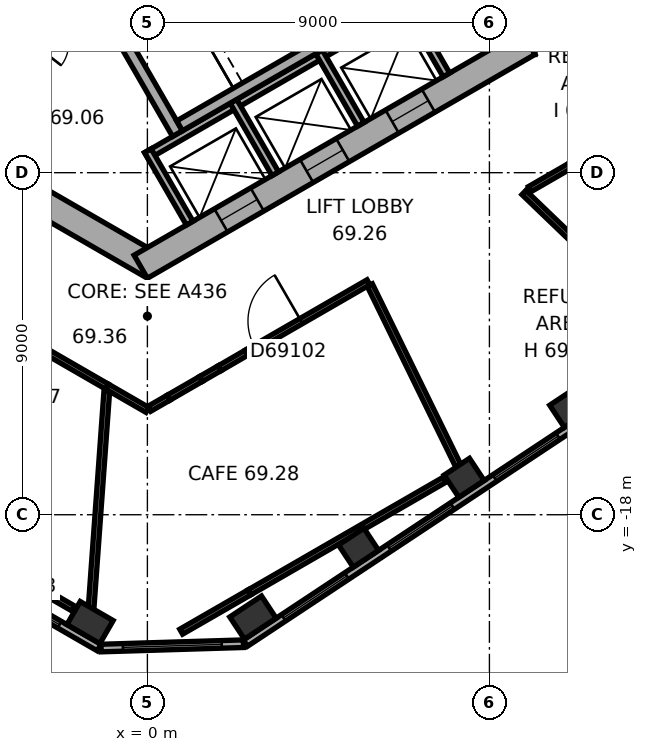
"""IFC4 building model, lengths in metres.
Left out: names, types, materials, properties, quantities, classifications, styles, units other than length and angle.
Written with IfcOpenShell. Run it as: python <this file> out.ifc"""

import sys

from ifc_helpers import new_model, si_unit, direction, frame, frame_2d, origin, origin_2d, place, context, subcontext, project, spatial, rectangle, extrude, element, fill, save


model = new_model("IFC4")
c1 = context("Model", 3, precision=1e-05, world=origin(), true_north=direction((0.0, 1.0)))
c2 = subcontext(c1, "Body", "Model", "MODEL_VIEW")
j1 = project(units=[si_unit("LENGTHUNIT", "METRE"), si_unit("PLANEANGLEUNIT", "RADIAN")], contexts=[c1])
p1 = place(None, origin())
s1 = spatial("IfcSite", under=j1, at=p1, CompositionType="ELEMENT")
p2 = place(p1, origin())
s2 = spatial("IfcBuilding", under=s1, at=p2, CompositionType="ELEMENT")
p3 = place(p2, frame((0.0, 0.0, 278.3)))
s3 = spatial("IfcBuildingStorey", under=s2, at=p3, CompositionType="ELEMENT", Elevation=278.3)
for number, where, z_axis, x_axis in (
    (1, (-1.509, -20.837, 0.0), (0.0, 0.0, 1.0), (0.866, -0.5, 0.0)),
    (2, (2.778, -20.706, 0.0), (0.0, 0.0, 1.0), (0.834, 0.552, 0.0)),
):
    element("IfcColumn", number, at=place(p3, frame(where, z_axis=z_axis, x_axis=x_axis)), inside=s3, PredefinedType="COLUMN", context=c2, shape_type="SweptSolid", body=[
        extrude(rectangle(XDim=1.0, YDim=0.7, at=origin_2d()), origin(), (0.0, 0.0, 1.0), 7.4),
    ])
for number, where, z_axis, x_axis in (
    (3, (5.557, -18.867, 0.0), (0.0, 0.0, 1.0), (0.834, 0.552, 0.0)),
    (4, (8.335, -17.028, 0.0), (0.0, 0.0, 1.0), (0.834, 0.552, 0.0)),
    (5, (11.113, -15.189, 0.0), (0.0, 0.0, 1.0), (0.834, 0.552, 0.0)),
):
    element("IfcColumn", number, at=place(p3, frame(where, z_axis=z_axis, x_axis=x_axis)), inside=s3, PredefinedType="COLUMN", context=c2, shape_type="SweptSolid", body=[
        extrude(rectangle(XDim=0.8, YDim=0.7, at=origin_2d()), origin(), (0.0, 0.0, 1.0), 7.4),
    ])
p4 = place(p3, frame((9.85, -5.889, 0.0), z_axis=(0.0, 0.0, 1.0), x_axis=(0.0, 1.0, 0.0)))
e6 = element("IfcWall", 6, at=p4, inside=s3, PredefinedType="SHEAR", context=c2, shape_type="SweptSolid", body=[
    extrude(rectangle(XDim=11.778, YDim=0.7, at=frame_2d((5.889, 0.0))), origin(), (0.0, 0.0, 1.0), 7.4),
])
p5 = place(p4, frame((6.089, 0.0, 0.0)))
e7 = element("IfcOpeningElement", 7, at=p5, cuts=e6, PredefinedType="OPENING", context=c2, shape_type="SweptSolid", body=[
    extrude(rectangle(XDim=1.5, YDim=2.1, at=frame_2d((0.75, 1.05))), frame((0.0, 0.36, 0.0), z_axis=(0.0, -1.0, 0.0), x_axis=(1.0, 0.0, 0.0)), (0.0, 0.0, 1.0), 0.72),
])
p6 = place(p4, frame((2.939, 0.0, 0.0)))
e8 = element("IfcOpeningElement", 8, at=p6, cuts=e6, PredefinedType="OPENING", context=c2, shape_type="SweptSolid", body=[
    extrude(rectangle(XDim=0.9, YDim=2.1, at=frame_2d((0.45, 1.05))), frame((0.0, 0.36, 0.0), z_axis=(0.0, -1.0, 0.0), x_axis=(1.0, 0.0, 0.0)), (0.0, 0.0, 1.0), 0.72),
])
p7 = place(p3, frame((-10.025, -5.586, 0.0), z_axis=(0.0, 0.0, 1.0), x_axis=(0.866026453023, -0.499998182661, 0.0)))
e9 = element("IfcWall", 9, at=p7, inside=s3, PredefinedType="SHEAR", context=c2, shape_type="SweptSolid", body=[
    extrude(rectangle(XDim=11.778, YDim=0.7, at=frame_2d((5.889, 0.0))), origin(), (0.0, 0.0, 1.0), 7.4),
])
p8 = place(p7, frame((6.089, 0.0, 0.0)))
e10 = element("IfcOpeningElement", 10, at=p8, cuts=e9, PredefinedType="OPENING", context=c2, shape_type="SweptSolid", body=[
    extrude(rectangle(XDim=1.5, YDim=2.1, at=frame_2d((0.75, 1.05))), frame((0.0, 0.36, 0.0), z_axis=(0.0, -1.0, 0.0), x_axis=(1.0, 0.0, 0.0)), (0.0, 0.0, 1.0), 0.72),
])
p9 = place(p7, frame((1.539, 0.0, 0.0)))
e11 = element("IfcOpeningElement", 11, at=p9, cuts=e9, PredefinedType="OPENING", context=c2, shape_type="SweptSolid", body=[
    extrude(rectangle(XDim=1.1, YDim=2.1, at=frame_2d((0.55, 1.05))), frame((0.0, 0.36, 0.0), z_axis=(0.0, -1.0, 0.0), x_axis=(1.0, 0.0, 0.0)), (0.0, 0.0, 1.0), 0.72),
])
p10 = place(p7, frame((4.139, 0.0, 0.0)))
e12 = element("IfcOpeningElement", 12, at=p10, cuts=e9, PredefinedType="OPENING", context=c2, shape_type="SweptSolid", body=[
    extrude(rectangle(XDim=1.1, YDim=2.1, at=frame_2d((0.55, 1.05))), frame((0.0, 0.36, 0.0), z_axis=(0.0, -1.0, 0.0), x_axis=(1.0, 0.0, 0.0)), (0.0, 0.0, 1.0), 0.72),
])
p11 = place(p3, frame((-0.175, -11.475, 0.0), z_axis=(0.0, 0.0, 1.0), x_axis=(0.866026453023, 0.499998182661, 0.0)))
e13 = element("IfcWall", 13, at=p11, inside=s3, PredefinedType="SHEAR", context=c2, shape_type="SweptSolid", body=[
    extrude(rectangle(XDim=11.778, YDim=0.7, at=frame_2d((5.889, 0.0))), origin(), (0.0, 0.0, 1.0), 7.4),
])
p12 = place(p11, frame((2.439, 0.0, 0.0)))
e14 = element("IfcOpeningElement", 14, at=p12, cuts=e13, PredefinedType="OPENING", context=c2, shape_type="SweptSolid", body=[
    extrude(rectangle(XDim=1.1, YDim=2.1, at=frame_2d((0.55, 1.05))), frame((0.0, 0.36, 0.0), z_axis=(0.0, -1.0, 0.0), x_axis=(1.0, 0.0, 0.0)), (0.0, 0.0, 1.0), 0.72),
])
p13 = place(p11, frame((5.039, 0.0, 0.0)))
e15 = element("IfcOpeningElement", 15, at=p13, cuts=e13, PredefinedType="OPENING", context=c2, shape_type="SweptSolid", body=[
    extrude(rectangle(XDim=1.1, YDim=2.1, at=frame_2d((0.55, 1.05))), frame((0.0, 0.36, 0.0), z_axis=(0.0, -1.0, 0.0), x_axis=(1.0, 0.0, 0.0)), (0.0, 0.0, 1.0), 0.72),
])
p14 = place(p11, frame((7.639, 0.0, 0.0)))
e16 = element("IfcOpeningElement", 16, at=p14, cuts=e13, PredefinedType="OPENING", context=c2, shape_type="SweptSolid", body=[
    extrude(rectangle(XDim=1.1, YDim=2.1, at=frame_2d((0.55, 1.05))), frame((0.0, 0.36, 0.0), z_axis=(0.0, -1.0, 0.0), x_axis=(1.0, 0.0, 0.0)), (0.0, 0.0, 1.0), 0.72),
])
p15 = place(p3, frame((-16.626, -12.629, 0.0), z_axis=(0.0, 0.0, 1.0), x_axis=(0.866026460444, -0.499998169808, 0.0)))
e17 = element("IfcWall", 17, at=p15, inside=s3, PredefinedType="STANDARD", context=c2, shape_type="SweptSolid", body=[
    extrude(rectangle(XDim=17.731, YDim=0.2, at=frame_2d((8.866, 0.0))), origin(), (0.0, 0.0, 1.0), 7.4),
])
p16 = place(p15, frame((1.203, 0.0, 0.8)))
e18 = element("IfcOpeningElement", 18, at=p16, cuts=e17, PredefinedType="OPENING", context=c2, shape_type="SweptSolid", body=[
    extrude(rectangle(XDim=2.0, YDim=4.2, at=frame_2d((1.0, 2.1))), frame((0.0, 0.11, 0.0), z_axis=(0.0, -1.0, 0.0), x_axis=(1.0, 0.0, 0.0)), (0.0, 0.0, 1.0), 0.22),
])
p17 = place(p15, frame((4.535, 0.0, 0.8)))
e19 = element("IfcOpeningElement", 19, at=p17, cuts=e17, PredefinedType="OPENING", context=c2, shape_type="SweptSolid", body=[
    extrude(rectangle(XDim=2.0, YDim=4.2, at=frame_2d((1.0, 2.1))), frame((0.0, 0.11, 0.0), z_axis=(0.0, -1.0, 0.0), x_axis=(1.0, 0.0, 0.0)), (0.0, 0.0, 1.0), 0.22),
])
p18 = place(p15, frame((7.867, 0.0, 0.8)))
e20 = element("IfcOpeningElement", 20, at=p18, cuts=e17, PredefinedType="OPENING", context=c2, shape_type="SweptSolid", body=[
    extrude(rectangle(XDim=2.0, YDim=4.2, at=frame_2d((1.0, 2.1))), frame((0.0, 0.11, 0.0), z_axis=(0.0, -1.0, 0.0), x_axis=(1.0, 0.0, 0.0)), (0.0, 0.0, 1.0), 0.22),
])
p19 = place(p15, frame((11.198, 0.0, 0.8)))
e21 = element("IfcOpeningElement", 21, at=p19, cuts=e17, PredefinedType="OPENING", context=c2, shape_type="SweptSolid", body=[
    extrude(rectangle(XDim=2.0, YDim=4.2, at=frame_2d((1.0, 2.1))), frame((0.0, 0.11, 0.0), z_axis=(0.0, -1.0, 0.0), x_axis=(1.0, 0.0, 0.0)), (0.0, 0.0, 1.0), 0.22),
])
p20 = place(p15, frame((14.53, 0.0, 0.8)))
e22 = element("IfcOpeningElement", 22, at=p20, cuts=e17, PredefinedType="OPENING", context=c2, shape_type="SweptSolid", body=[
    extrude(rectangle(XDim=2.0, YDim=4.2, at=frame_2d((1.0, 2.1))), frame((0.0, 0.11, 0.0), z_axis=(0.0, -1.0, 0.0), x_axis=(1.0, 0.0, 0.0)), (0.0, 0.0, 1.0), 0.22),
])
p21 = place(p3, frame((-1.217, -21.508, 0.0), z_axis=(0.0, 0.0, 1.0), x_axis=(0.99953295295, 0.030559384285, 0.0)))
e23 = element("IfcWall", 23, at=p21, inside=s3, PredefinedType="STANDARD", context=c2, shape_type="SweptSolid", body=[
    extrude(rectangle(XDim=3.747, YDim=0.2, at=frame_2d((1.874, 0.0))), origin(), (0.0, 0.0, 1.0), 7.4),
])
p22 = place(p21, frame((0.573, 0.0, 0.8)))
e24 = element("IfcOpeningElement", 24, at=p22, cuts=e23, PredefinedType="OPENING", context=c2, shape_type="SweptSolid", body=[
    extrude(rectangle(XDim=2.6, YDim=4.2, at=frame_2d((1.3, 2.1))), frame((0.0, 0.11, 0.0), z_axis=(0.0, -1.0, 0.0), x_axis=(1.0, 0.0, 0.0)), (0.0, 0.0, 1.0), 0.22),
])
p23 = place(p3, frame((2.58, -21.377, 0.0), z_axis=(0.0, 0.0, 1.0), x_axis=(0.833888592176, 0.551932800112, 0.0)))
e25 = element("IfcWall", 25, at=p23, inside=s3, PredefinedType="STANDARD", context=c2, shape_type="SweptSolid", body=[
    extrude(rectangle(XDim=17.731, YDim=0.2, at=frame_2d((8.866, 0.0))), origin(), (0.0, 0.0, 1.0), 7.4),
])
p24 = place(p23, frame((1.202, 0.0, 0.8)))
e26 = element("IfcOpeningElement", 26, at=p24, cuts=e25, PredefinedType="OPENING", context=c2, shape_type="SweptSolid", body=[
    extrude(rectangle(XDim=2.0, YDim=4.2, at=frame_2d((1.0, 2.1))), frame((0.0, 0.11, 0.0), z_axis=(0.0, -1.0, 0.0), x_axis=(1.0, 0.0, 0.0)), (0.0, 0.0, 1.0), 0.22),
])
p25 = place(p23, frame((4.533, 0.0, 0.8)))
e27 = element("IfcOpeningElement", 27, at=p25, cuts=e25, PredefinedType="OPENING", context=c2, shape_type="SweptSolid", body=[
    extrude(rectangle(XDim=2.0, YDim=4.2, at=frame_2d((1.0, 2.1))), frame((0.0, 0.11, 0.0), z_axis=(0.0, -1.0, 0.0), x_axis=(1.0, 0.0, 0.0)), (0.0, 0.0, 1.0), 0.22),
])
p26 = place(p23, frame((7.865, 0.0, 0.8)))
e28 = element("IfcOpeningElement", 28, at=p26, cuts=e25, PredefinedType="OPENING", context=c2, shape_type="SweptSolid", body=[
    extrude(rectangle(XDim=2.0, YDim=4.2, at=frame_2d((1.0, 2.1))), frame((0.0, 0.11, 0.0), z_axis=(0.0, -1.0, 0.0), x_axis=(1.0, 0.0, 0.0)), (0.0, 0.0, 1.0), 0.22),
])
p27 = place(p23, frame((11.197, 0.0, 0.8)))
e29 = element("IfcOpeningElement", 29, at=p27, cuts=e25, PredefinedType="OPENING", context=c2, shape_type="SweptSolid", body=[
    extrude(rectangle(XDim=2.0, YDim=4.2, at=frame_2d((1.0, 2.1))), frame((0.0, 0.11, 0.0), z_axis=(0.0, -1.0, 0.0), x_axis=(1.0, 0.0, 0.0)), (0.0, 0.0, 1.0), 0.22),
])
p28 = place(p23, frame((14.528, 0.0, 0.8)))
e30 = element("IfcOpeningElement", 30, at=p28, cuts=e25, PredefinedType="OPENING", context=c2, shape_type="SweptSolid", body=[
    extrude(rectangle(XDim=2.0, YDim=4.2, at=frame_2d((1.0, 2.1))), frame((0.0, 0.11, 0.0), z_axis=(0.0, -1.0, 0.0), x_axis=(1.0, 0.0, 0.0)), (0.0, 0.0, 1.0), 0.22),
])
p29 = place(p3, frame((-0.024, -8.559, 0.0), z_axis=(0.0, 0.0, 1.0), x_axis=(0.866026010844, 0.49999894854, 0.0)))
e31 = element("IfcWall", 31, at=p29, inside=s3, PredefinedType="PARTITIONING", context=c2, shape_type="SweptSolid", body=[
    extrude(rectangle(XDim=8.0, YDim=0.2, at=frame_2d((4.0, 0.0))), origin(), (0.0, 0.0, 1.0), 7.12),
])
for number, where, z_axis, x_axis in (
    (32, (0.013, -8.422, 0.0), (0.0, 0.0, 1.0), (0.5, -0.866, 0.0)),
    (33, (2.264, -7.122, 0.0), (0.0, 0.0, 1.0), (0.5, -0.866, 0.0)),
    (34, (4.516, -5.822, 0.0), (0.0, 0.0, 1.0), (0.5, -0.866, 0.0)),
    (35, (6.768, -4.522, 0.0), (0.0, 0.0, 1.0), (0.5, -0.866, 0.0)),
):
    element("IfcWall", number, at=place(p3, frame(where, z_axis=z_axis, x_axis=x_axis)), inside=s3, PredefinedType="PARTITIONING", context=c2, shape_type="SweptSolid", body=[
        extrude(rectangle(XDim=2.2, YDim=0.2, at=frame_2d((1.1, 0.0))), origin(), (0.0, 0.0, 1.0), 7.12),
    ])
p30 = place(p3, frame((-1.558, -3.902, 0.0), z_axis=(0.0, 0.0, 1.0), x_axis=(0.499977259774, -0.866038532462, 0.0)))
e36 = element("IfcWall", 36, at=p30, inside=s3, PredefinedType="SHEAR", context=c2, shape_type="SweptSolid", body=[
    extrude(rectangle(XDim=4.7, YDim=0.3, at=frame_2d((2.35, 0.0))), origin(), (0.0, 0.0, 1.0), 7.12),
])
p31 = place(p30, frame((0.8, 0.0, 0.0)))
e37 = element("IfcOpeningElement", 37, at=p31, cuts=e36, PredefinedType="OPENING", context=c2, shape_type="SweptSolid", body=[
    extrude(rectangle(XDim=1.2, YDim=2.1, at=frame_2d((0.6, 1.05))), frame((0.0, 0.16, 0.0), z_axis=(0.0, -1.0, 0.0), x_axis=(1.0, 0.0, 0.0)), (0.0, 0.0, 1.0), 0.32),
])
p32 = place(p3, frame((0.847, -7.767, 0.0), z_axis=(0.0, 0.0, 1.0), x_axis=(0.866027801685, 0.499995846692, 0.0)))
e38 = element("IfcWall", 38, at=p32, inside=s3, PredefinedType="SHEAR", context=c2, shape_type="SweptSolid", body=[
    extrude(rectangle(XDim=7.06, YDim=0.3, at=frame_2d((3.53, 0.0))), origin(), (0.0, 0.0, 1.0), 7.12),
])
p33 = place(p3, frame((-1.712, -4.008, 0.0), z_axis=(0.0, 0.0, 1.0), x_axis=(-0.616549420702, -0.787316208287, 0.0)))
e39 = element("IfcWall", 39, at=p33, inside=s3, PredefinedType="PARTITIONING", context=c2, shape_type="SweptSolid", body=[
    extrude(rectangle(XDim=3.002, YDim=0.2, at=frame_2d((1.501, 0.0))), origin(), (0.0, 0.0, 1.0), 7.12),
])
p34 = place(p33, frame((1.15, 0.0, 0.0)))
e40 = element("IfcOpeningElement", 40, at=p34, cuts=e39, PredefinedType="OPENING", context=c2, shape_type="SweptSolid", body=[
    extrude(rectangle(XDim=0.9, YDim=2.1, at=frame_2d((0.45, 1.05))), frame((0.0, 0.11, 0.0), z_axis=(0.0, -1.0, 0.0), x_axis=(1.0, 0.0, 0.0)), (0.0, 0.0, 1.0), 0.22),
])
p35 = place(p3, frame((-1.935, -20.475, 0.0), z_axis=(0.0, 0.0, 1.0), x_axis=(-0.866082714023, 0.499900722615, 0.0)))
e41 = element("IfcWall", 41, at=p35, inside=s3, PredefinedType="PARTITIONING", context=c2, shape_type="SweptSolid", body=[
    extrude(rectangle(XDim=2.332, YDim=0.15, at=frame_2d((1.166, 0.0))), origin(), (0.0, 0.0, 1.0), 6.62),
])
p36 = place(p3, frame((2.686, -20.042, 0.0), z_axis=(0.0, 0.0, 1.0), x_axis=(-0.866491264661, -0.499192235784, 0.0)))
e42 = element("IfcWall", 42, at=p36, inside=s3, PredefinedType="PARTITIONING", context=c2, shape_type="SweptSolid", body=[
    extrude(rectangle(XDim=2.073, YDim=0.15, at=frame_2d((1.037, 0.0))), origin(), (0.0, 0.0, 1.0), 7.12),
])
p37 = place(p3, frame((2.689, -20.041, 0.0), z_axis=(0.0, 0.0, 1.0), x_axis=(0.866025885238, 0.499999166098, 0.0)))
e43 = element("IfcWall", 43, at=p37, inside=s3, PredefinedType="PARTITIONING", context=c2, shape_type="SweptSolid", body=[
    extrude(rectangle(XDim=5.932, YDim=0.15, at=frame_2d((2.966, 0.0))), origin(), (0.0, 0.0, 1.0), 7.12),
])
p38 = place(p3, frame((0.052, -15.212, 0.0), z_axis=(0.0, 0.0, 1.0), x_axis=(0.866171626203, 0.499746649774, 0.0)))
e44 = element("IfcWall", 44, at=p38, inside=s3, PredefinedType="PARTITIONING", context=c2, shape_type="SweptSolid", body=[
    extrude(rectangle(XDim=0.582, YDim=0.15, at=frame_2d((0.291, 0.0))), origin(), (0.0, 0.0, 1.0), 7.12),
])
p39 = place(p3, frame((0.556, -14.921, 0.0), z_axis=(0.0, 0.0, 1.0), x_axis=(0.865917507238, 0.500186835751, 0.0)))
e45 = element("IfcWall", 45, at=p39, inside=s3, PredefinedType="PARTITIONING", context=c2, shape_type="SweptSolid", body=[
    extrude(rectangle(XDim=0.986, YDim=0.15, at=frame_2d((0.493, 0.0))), origin(), (0.0, 0.0, 1.0), 7.12),
])
p40 = place(p3, frame((-1.068, -14.75, 0.0), z_axis=(0.0, 0.0, 1.0), x_axis=(-0.072252084435, -0.997386402702, 0.0)))
e46 = element("IfcWall", 46, at=p40, inside=s3, PredefinedType="PARTITIONING", context=c2, shape_type="SweptSolid", body=[
    extrude(rectangle(XDim=5.714, YDim=0.15, at=frame_2d((2.857, 0.0))), origin(), (0.0, 0.0, 1.0), 7.12),
])
p41 = place(p3, frame((-1.06, -14.631, 0.0), z_axis=(0.0, 0.0, 1.0), x_axis=(0.866172295251, -0.499745490164, 0.0)))
e47 = element("IfcWall", 47, at=p41, inside=s3, PredefinedType="PARTITIONING", context=c2, shape_type="SweptSolid", body=[
    extrude(rectangle(XDim=1.223, YDim=0.15, at=frame_2d((0.612, 0.0))), origin(), (0.0, 0.0, 1.0), 7.12),
])
p42 = place(p3, frame((-1.06, -14.631, 0.0), z_axis=(0.0, 0.0, 1.0), x_axis=(-0.8659514991, 0.500127984827, 0.0)))
e48 = element("IfcWall", 48, at=p42, inside=s3, PredefinedType="PARTITIONING", context=c2, shape_type="SweptSolid", body=[
    extrude(rectangle(XDim=1.876, YDim=0.15, at=frame_2d((0.938, 0.0))), origin(), (0.0, 0.0, 1.0), 7.12),
])
p43 = place(p3, frame((1.41, -14.428, 0.0), z_axis=(0.0, 0.0, 1.0), x_axis=(0.865940158947, 0.500147619332, 0.0)))
e49 = element("IfcWall", 49, at=p43, inside=s3, PredefinedType="PARTITIONING", context=c2, shape_type="SweptSolid", body=[
    extrude(rectangle(XDim=0.563, YDim=0.15, at=frame_2d((0.282, 0.0))), origin(), (0.0, 0.0, 1.0), 7.12),
])
p44 = place(p3, frame((1.904, -14.145, 0.0), z_axis=(0.0, 0.0, 1.0), x_axis=(0.864830459613, 0.502064015964, 0.0)))
e50 = element("IfcWall", 50, at=p44, inside=s3, PredefinedType="PARTITIONING", context=c2, shape_type="SweptSolid", body=[
    extrude(rectangle(XDim=0.824, YDim=0.15, at=frame_2d((0.412, 0.0))), origin(), (0.0, 0.0, 1.0), 7.12),
])
p45 = place(p3, frame((13.633, -13.102, 0.0), z_axis=(0.0, 0.0, 1.0), x_axis=(-0.721024625755, 0.692909437845, 0.0)))
e51 = element("IfcWall", 51, at=p45, inside=s3, PredefinedType="PARTITIONING", context=c2, shape_type="SweptSolid", body=[
    extrude(rectangle(XDim=5.167, YDim=0.15, at=frame_2d((2.583, 0.0))), origin(), (0.0, 0.0, 1.0), 6.57),
])
p46 = place(p3, frame((5.852, -11.956, 0.0), z_axis=(0.0, 0.0, 1.0), x_axis=(0.439616976251, -0.898185345122, 0.0)))
e52 = element("IfcWall", 52, at=p46, inside=s3, PredefinedType="PARTITIONING", context=c2, shape_type="SweptSolid", body=[
    extrude(rectangle(XDim=5.295, YDim=0.15, at=frame_2d((2.647, 0.0))), origin(), (0.0, 0.0, 1.0), 6.57),
])
p47 = place(p3, frame((5.817, -11.884, 0.0), z_axis=(0.0, 0.0, 1.0), x_axis=(-0.866001804008, -0.500040873783, 0.0)))
e53 = element("IfcWall", 53, at=p47, inside=s3, PredefinedType="PARTITIONING", context=c2, shape_type="SweptSolid", body=[
    extrude(rectangle(XDim=3.695, YDim=0.15, at=frame_2d((1.847, 0.0))), origin(), (0.0, 0.0, 1.0), 7.12),
])
p48 = place(p47, frame((2.044, 0.0, 0.0)))
e54 = element("IfcOpeningElement", 54, at=p48, cuts=e53, PredefinedType="OPENING", context=c2, shape_type="SweptSolid", body=[
    extrude(rectangle(XDim=1.4, YDim=2.4, at=frame_2d((0.7, 1.2))), frame((0.0, 0.085, 0.0), z_axis=(0.0, -1.0, 0.0), x_axis=(1.0, 0.0, 0.0)), (0.0, 0.0, 1.0), 0.17),
])
p49 = place(p3, frame((11.127, -8.817, 0.0), z_axis=(0.0, 0.0, 1.0), x_axis=(-0.866020046725, -0.500009278584, 0.0)))
e55 = element("IfcWall", 55, at=p49, inside=s3, PredefinedType="PARTITIONING", context=c2, shape_type="SweptSolid", body=[
    extrude(rectangle(XDim=1.228, YDim=0.15, at=frame_2d((0.614, 0.0))), origin(), (0.0, 0.0, 1.0), 7.12),
])
p50 = place(p20, origin())
e56 = element("IfcWindow", 56, at=p50, inside=s3, PartitioningType="SINGLE_PANEL", PredefinedType="WINDOW", context=c2, shape_type="SweptSolid", body=[
    extrude(rectangle(XDim=2.0, YDim=4.2, at=frame_2d((1.0, 2.1))), frame((0.0, 0.03, 0.0), z_axis=(0.0, -1.0, 0.0), x_axis=(1.0, 0.0, 0.0)), (0.0, 0.0, 1.0), 0.06),
])
fill(e22, e56)
p51 = place(p22, origin())
e57 = element("IfcWindow", 57, at=p51, inside=s3, PartitioningType="SINGLE_PANEL", PredefinedType="WINDOW", context=c2, shape_type="SweptSolid", body=[
    extrude(rectangle(XDim=2.6, YDim=4.2, at=frame_2d((1.3, 2.1))), frame((0.0, 0.03, 0.0), z_axis=(0.0, -1.0, 0.0), x_axis=(1.0, 0.0, 0.0)), (0.0, 0.0, 1.0), 0.06),
])
fill(e24, e57)
p52 = place(p24, origin())
e58 = element("IfcWindow", 58, at=p52, inside=s3, PartitioningType="SINGLE_PANEL", PredefinedType="WINDOW", context=c2, shape_type="SweptSolid", body=[
    extrude(rectangle(XDim=2.0, YDim=4.2, at=frame_2d((1.0, 2.1))), frame((0.0, 0.03, 0.0), z_axis=(0.0, -1.0, 0.0), x_axis=(1.0, 0.0, 0.0)), (0.0, 0.0, 1.0), 0.06),
])
fill(e26, e58)
p53 = place(p25, origin())
e59 = element("IfcWindow", 59, at=p53, inside=s3, PartitioningType="SINGLE_PANEL", PredefinedType="WINDOW", context=c2, shape_type="SweptSolid", body=[
    extrude(rectangle(XDim=2.0, YDim=4.2, at=frame_2d((1.0, 2.1))), frame((0.0, 0.03, 0.0), z_axis=(0.0, -1.0, 0.0), x_axis=(1.0, 0.0, 0.0)), (0.0, 0.0, 1.0), 0.06),
])
fill(e27, e59)
p54 = place(p26, origin())
e60 = element("IfcWindow", 60, at=p54, inside=s3, PartitioningType="SINGLE_PANEL", PredefinedType="WINDOW", context=c2, shape_type="SweptSolid", body=[
    extrude(rectangle(XDim=2.0, YDim=4.2, at=frame_2d((1.0, 2.1))), frame((0.0, 0.03, 0.0), z_axis=(0.0, -1.0, 0.0), x_axis=(1.0, 0.0, 0.0)), (0.0, 0.0, 1.0), 0.06),
])
fill(e28, e60)
p55 = place(p12, origin())
e61 = element("IfcDoor", 61, at=p55, inside=s3, OperationType="DOUBLE_DOOR_SLIDING", PredefinedType="DOOR", context=c2, shape_type="SweptSolid", body=[
    extrude(rectangle(XDim=1.1, YDim=2.1, at=frame_2d((0.55, 1.05))), frame((0.0, 0.025, 0.0), z_axis=(0.0, -1.0, 0.0), x_axis=(1.0, 0.0, 0.0)), (0.0, 0.0, 1.0), 0.05),
])
fill(e14, e61)
p56 = place(p13, origin())
e62 = element("IfcDoor", 62, at=p56, inside=s3, OperationType="DOUBLE_DOOR_SLIDING", PredefinedType="DOOR", context=c2, shape_type="SweptSolid", body=[
    extrude(rectangle(XDim=1.1, YDim=2.1, at=frame_2d((0.55, 1.05))), frame((0.0, 0.025, 0.0), z_axis=(0.0, -1.0, 0.0), x_axis=(1.0, 0.0, 0.0)), (0.0, 0.0, 1.0), 0.05),
])
fill(e15, e62)
p57 = place(p14, origin())
e63 = element("IfcDoor", 63, at=p57, inside=s3, OperationType="DOUBLE_DOOR_SLIDING", PredefinedType="DOOR", context=c2, shape_type="SweptSolid", body=[
    extrude(rectangle(XDim=1.1, YDim=2.1, at=frame_2d((0.55, 1.05))), frame((0.0, 0.025, 0.0), z_axis=(0.0, -1.0, 0.0), x_axis=(1.0, 0.0, 0.0)), (0.0, 0.0, 1.0), 0.05),
])
fill(e16, e63)
p58 = place(p48, origin())
e64 = element("IfcDoor", 64, at=p58, inside=s3, OperationType="SINGLE_SWING_LEFT", PredefinedType="DOOR", context=c2, shape_type="SweptSolid", body=[
    extrude(rectangle(XDim=1.4, YDim=2.4, at=frame_2d((0.7, 1.2))), frame((0.0, 0.025, 0.0), z_axis=(0.0, -1.0, 0.0), x_axis=(1.0, 0.0, 0.0)), (0.0, 0.0, 1.0), 0.05),
])
fill(e54, e64)
save(model, sys.argv[1])
